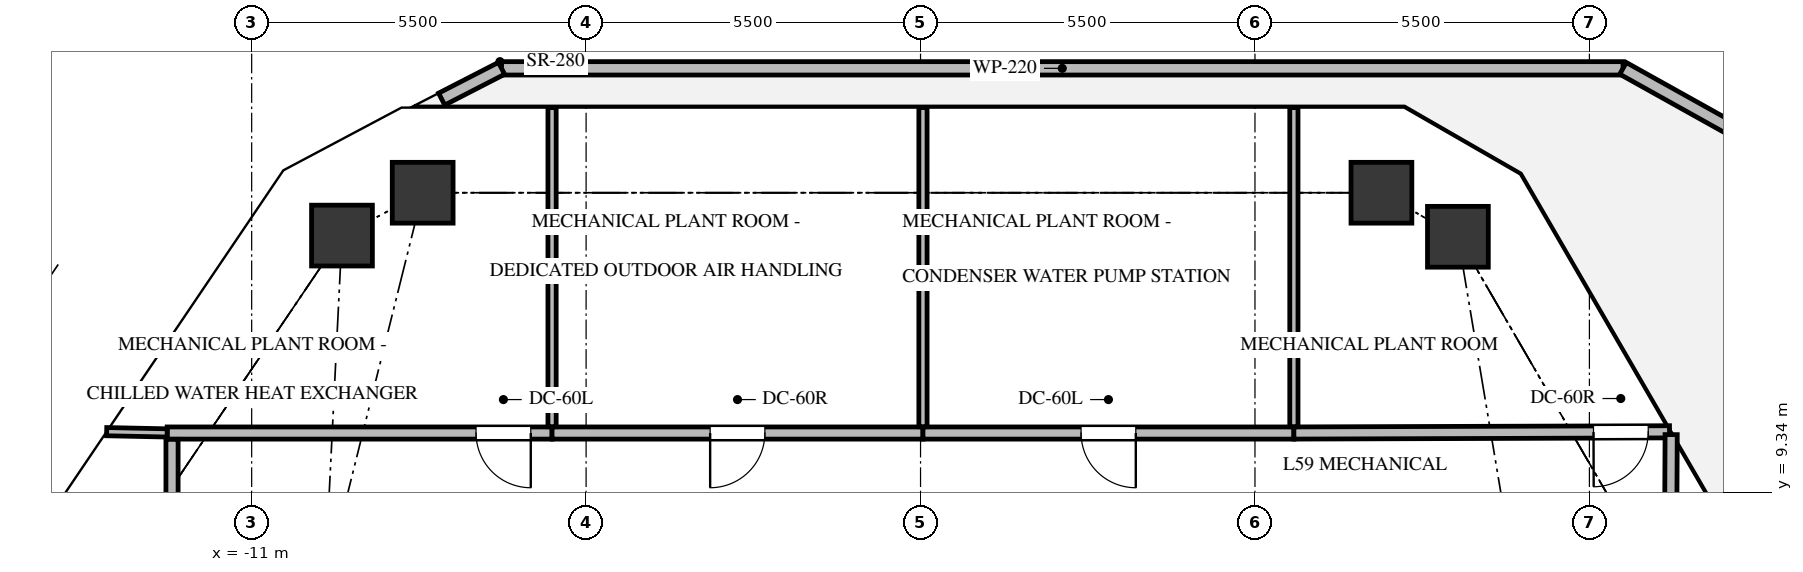
"""IFC4 building model, lengths in metres.
Left out: names, types, materials, properties, quantities, classifications, styles, units other than length and angle.
Written with IfcOpenShell. Run it as: python <this file> out.ifc"""

import sys

from ifc_helpers import new_model, si_unit, direction, frame, frame_2d, origin, origin_2d, place, context, subcontext, project, spatial, rectangle, extrude, source, transform, mapped, element, fill, save


model = new_model("IFC4")
c1 = context("Model", 3, precision=1e-05, world=origin(), true_north=direction((0.0, 1.0)))
c2 = subcontext(c1, "Body", "Model", "MODEL_VIEW")
j1 = project(units=[si_unit("LENGTHUNIT", "METRE"), si_unit("PLANEANGLEUNIT", "RADIAN")], contexts=[c1])
p1 = place(None, origin())
s1 = spatial("IfcSite", under=j1, at=p1, CompositionType="ELEMENT")
p2 = place(p1, origin())
s2 = spatial("IfcBuilding", under=s1, at=p2, CompositionType="ELEMENT")
p3 = place(p2, frame((0.0, 0.0, 213.4)))
s3 = spatial("IfcBuildingStorey", under=s2, at=p3, CompositionType="ELEMENT", Elevation=213.4)
m1 = source(origin(), c2, "Body", "SweptSolid", [
    extrude(rectangle(XDim=1.0, YDim=1.0, at=origin_2d()), origin(), (0.0, 0.0, 1.0), 4.96),
])
for number, where, z_axis, x_axis in (
    (1, (-9.515, 13.557, -0.3), (0.0, 0.0, 1.0), (1.0, 0.0, 0.0)),
    (2, (-8.188, 14.262, -0.3), (0.0, 0.0, 1.0), (1.0, 0.0, 0.0)),
    (3, (7.58, 14.262, -0.3), (0.0, 0.0, 1.0), (1.0, 0.0, 0.0)),
    (4, (8.837, 13.538, -0.3), (0.0, 0.0, 1.0), (1.0, 0.0, 0.0)),
):
    element("IfcColumn", number, at=place(p3, frame(where, z_axis=z_axis, x_axis=x_axis)), inside=s3, PredefinedType="COLUMN", context=c2, shape_type="MappedRepresentation", body=[
        mapped(m1, transform((0.0, 0.0, 0.0), x_axis=(1.0, 0.0, 0.0), y_axis=(0.0, 1.0, 0.0), z_axis=(0.0, 0.0, 1.0), scale=1.0)),
    ])
p4 = place(p3, frame((-6.891, 16.308, 0.0), z_axis=(0.0, 0.0, 1.0), x_axis=(1.0, 0.0, 0.0)))
e5 = element("IfcWall", 5, at=p4, inside=s3, PredefinedType="PARAPET", context=c2, shape_type="SweptSolid", body=[
    extrude(rectangle(XDim=18.443, YDim=0.22, at=frame_2d((9.222, 0.0))), origin(), (0.0, 0.0, 1.0), 1.2),
])
p5 = place(p3, frame((11.553, 16.308, 0.0), z_axis=(0.0, 0.0, 1.0), x_axis=(0.873406612347, -0.486991672936, 0.0)))
e6 = element("IfcWall", 6, at=p5, inside=s3, PredefinedType="PARAPET", context=c2, shape_type="SweptSolid", body=[
    extrude(rectangle(XDim=2.243, YDim=0.22, at=frame_2d((1.122, 0.0))), origin(), (0.0, 0.0, 1.0), 1.2),
])
p6 = place(p3, frame((-7.875, 15.802, 0.0), z_axis=(0.0, 0.0, 1.0), x_axis=(0.889387723215, 0.457153669781, 0.0)))
e7 = element("IfcWall", 7, at=p6, inside=s3, PredefinedType="PARAPET", context=c2, shape_type="SweptSolid", body=[
    extrude(rectangle(XDim=1.107, YDim=0.22, at=frame_2d((0.554, 0.0))), origin(), (0.0, 0.0, 1.0), 1.2),
])
p7 = place(p3, frame((-6.06, 10.31, 0.0), z_axis=(0.0, 0.0, 1.0), x_axis=(-1.0, 0.0, 0.0)))
e8 = element("IfcWall", 8, at=p7, inside=s3, PredefinedType="SOLIDWALL", context=c2, shape_type="SweptSolid", body=[
    extrude(rectangle(XDim=6.33, YDim=0.2, at=frame_2d((3.165, 0.0))), origin(), (0.0, 0.0, 1.0), 3.901),
])
p8 = place(p7, frame((0.35, 0.0, 0.0)))
e9 = element("IfcOpeningElement", 9, at=p8, cuts=e8, PredefinedType="OPENING", context=c2, shape_type="SweptSolid", body=[
    extrude(rectangle(XDim=0.9, YDim=2.05, at=frame_2d((0.45, 1.025))), frame((0.0, 0.11, 0.0), z_axis=(0.0, -1.0, 0.0), x_axis=(1.0, 0.0, 0.0)), (0.0, 0.0, 1.0), 0.22),
])
p9 = place(p3, frame((0.04, 10.31, 0.0), z_axis=(0.0, 0.0, 1.0), x_axis=(-1.0, 0.0, 0.0)))
e10 = element("IfcWall", 10, at=p9, inside=s3, PredefinedType="SOLIDWALL", context=c2, shape_type="SweptSolid", body=[
    extrude(rectangle(XDim=6.1, YDim=0.2, at=frame_2d((3.05, 0.0))), origin(), (0.0, 0.0, 1.0), 4.208),
])
p10 = place(p9, frame((2.6, 0.0, 0.0)))
e11 = element("IfcOpeningElement", 11, at=p10, cuts=e10, PredefinedType="OPENING", context=c2, shape_type="SweptSolid", body=[
    extrude(rectangle(XDim=0.9, YDim=2.05, at=frame_2d((0.45, 1.025))), frame((0.0, 0.11, 0.0), z_axis=(0.0, -1.0, 0.0), x_axis=(1.0, 0.0, 0.0)), (0.0, 0.0, 1.0), 0.22),
])
p11 = place(p3, frame((6.14, 10.31, 0.0), z_axis=(0.0, 0.0, 1.0), x_axis=(-1.0, 0.0, 0.0)))
e12 = element("IfcWall", 12, at=p11, inside=s3, PredefinedType="SOLIDWALL", context=c2, shape_type="SweptSolid", body=[
    extrude(rectangle(XDim=6.1, YDim=0.2, at=frame_2d((3.05, 0.0))), origin(), (0.0, 0.0, 1.0), 4.208),
])
p12 = place(p11, frame((2.6, 0.0, 0.0)))
e13 = element("IfcOpeningElement", 13, at=p12, cuts=e12, PredefinedType="OPENING", context=c2, shape_type="SweptSolid", body=[
    extrude(rectangle(XDim=0.9, YDim=2.05, at=frame_2d((0.45, 1.025))), frame((0.0, 0.11, 0.0), z_axis=(0.0, -1.0, 0.0), x_axis=(1.0, 0.0, 0.0)), (0.0, 0.0, 1.0), 0.22),
])
p13 = place(p3, frame((12.318, 10.33, 0.0), z_axis=(0.0, 0.0, 1.0), x_axis=(-0.999994876599, -0.003201058528, 0.0)))
e14 = element("IfcWall", 14, at=p13, inside=s3, PredefinedType="SOLIDWALL", context=c2, shape_type="SweptSolid", body=[
    extrude(rectangle(XDim=6.178, YDim=0.2, at=frame_2d((3.089, 0.0))), origin(), (0.0, 0.0, 1.0), 3.901),
])
p14 = place(p13, frame((0.35, 0.0, 0.0)))
e15 = element("IfcOpeningElement", 15, at=p14, cuts=e14, PredefinedType="OPENING", context=c2, shape_type="SweptSolid", body=[
    extrude(rectangle(XDim=0.9, YDim=2.05, at=frame_2d((0.45, 1.025))), frame((0.0, 0.11, 0.0), z_axis=(0.0, -1.0, 0.0), x_axis=(1.0, 0.0, 0.0)), (0.0, 0.0, 1.0), 0.22),
])
p15 = place(p3, frame((12.31, 3.49, 0.0), z_axis=(0.0, 0.0, 1.0), x_axis=(0.005031021246, 0.999987344333, 0.0)))
e16 = element("IfcWall", 16, at=p15, inside=s3, PredefinedType="SOLIDWALL", context=c2, shape_type="SweptSolid", body=[
    extrude(rectangle(XDim=6.794, YDim=0.2, at=frame_2d((3.397, 0.0))), origin(), (0.0, 0.0, 1.0), 3.999),
])
p16 = place(p15, frame((2.947, 0.0, 0.0)))
e17 = element("IfcOpeningElement", 17, at=p16, cuts=e16, PredefinedType="OPENING", context=c2, shape_type="SweptSolid", body=[
    extrude(rectangle(XDim=0.9, YDim=2.05, at=frame_2d((0.45, 1.025))), frame((0.0, 0.11, 0.0), z_axis=(0.0, -1.0, 0.0), x_axis=(1.0, 0.0, 0.0)), (0.0, 0.0, 1.0), 0.22),
])
p17 = place(p3, frame((-12.31, 10.206, 0.0), z_axis=(0.0, 0.0, 1.0), x_axis=(0.0, -1.0, 0.0)))
e18 = element("IfcWall", 18, at=p17, inside=s3, PredefinedType="SOLIDWALL", context=c2, shape_type="SweptSolid", body=[
    extrude(rectangle(XDim=6.716, YDim=0.2, at=frame_2d((3.358, 0.0))), origin(), (0.0, 0.0, 1.0), 3.999),
])
p18 = place(p17, frame((2.908, 0.0, 0.0)))
e19 = element("IfcOpeningElement", 19, at=p18, cuts=e18, PredefinedType="OPENING", context=c2, shape_type="SweptSolid", body=[
    extrude(rectangle(XDim=0.9, YDim=2.05, at=frame_2d((0.45, 1.025))), frame((0.0, 0.11, 0.0), z_axis=(0.0, -1.0, 0.0), x_axis=(1.0, 0.0, 0.0)), (0.0, 0.0, 1.0), 0.22),
])
p19 = place(p3, frame((-6.06, 15.662, 0.0), z_axis=(0.0, 0.0, 1.0), x_axis=(0.0, -1.0, 0.0)))
e20 = element("IfcWall", 20, at=p19, inside=s3, PredefinedType="PARTITIONING", context=c2, shape_type="SweptSolid", body=[
    extrude(rectangle(XDim=5.248, YDim=0.135, at=frame_2d((2.624, 0.0))), origin(), (0.0, 0.0, 1.0), 3.999),
])
p20 = place(p3, frame((-12.39, 10.312, 0.0), z_axis=(0.0, 0.0, 1.0), x_axis=(-0.999782630862, 0.020849245246, 0.0)))
e21 = element("IfcWall", 21, at=p20, inside=s3, PredefinedType="PARTITIONING", context=c2, shape_type="SweptSolid", body=[
    extrude(rectangle(XDim=0.995, YDim=0.135, at=frame_2d((0.498, 0.0))), origin(), (0.0, 0.0, 1.0), 4.645),
])
p21 = place(p3, frame((0.04, 15.662, 0.0), z_axis=(0.0, 0.0, 1.0), x_axis=(0.0, -1.0, 0.0)))
e22 = element("IfcWall", 22, at=p21, inside=s3, PredefinedType="PARTITIONING", context=c2, shape_type="SweptSolid", body=[
    extrude(rectangle(XDim=5.248, YDim=0.135, at=frame_2d((2.624, 0.0))), origin(), (0.0, 0.0, 1.0), 3.999),
])
p22 = place(p3, frame((6.14, 15.662, 0.0), z_axis=(0.0, 0.0, 1.0), x_axis=(0.0, -1.0, 0.0)))
e23 = element("IfcWall", 23, at=p22, inside=s3, PredefinedType="PARTITIONING", context=c2, shape_type="SweptSolid", body=[
    extrude(rectangle(XDim=5.248, YDim=0.135, at=frame_2d((2.624, 0.0))), origin(), (0.0, 0.0, 1.0), 3.999),
])
m2 = source(origin(), c2, "Body", "SweptSolid", [
    extrude(rectangle(XDim=0.9, YDim=2.05, at=frame_2d((0.45, 1.025))), frame((0.0, 0.025, 0.0), z_axis=(0.0, -1.0, 0.0), x_axis=(1.0, 0.0, 0.0)), (0.0, 0.0, 1.0), 0.05),
])
p23 = place(p8, origin())
e24 = element("IfcDoor", 24, at=p23, inside=s3, OperationType="SINGLE_SWING_LEFT", PredefinedType="DOOR", context=c2, shape_type="MappedRepresentation", body=[
    mapped(m2, transform((0.0, 0.0, 0.0), x_axis=(1.0, 0.0, 0.0), y_axis=(0.0, 1.0, 0.0), z_axis=(0.0, 0.0, 1.0), scale=1.0)),
])
fill(e9, e24)
m3 = source(origin(), c2, "Body", "SweptSolid", [
    extrude(rectangle(XDim=0.9, YDim=2.05, at=frame_2d((0.45, 1.025))), frame((0.0, 0.025, 0.0), z_axis=(0.0, -1.0, 0.0), x_axis=(1.0, 0.0, 0.0)), (0.0, 0.0, 1.0), 0.05),
])
p24 = place(p10, origin())
e25 = element("IfcDoor", 25, at=p24, inside=s3, OperationType="SINGLE_SWING_RIGHT", PredefinedType="DOOR", context=c2, shape_type="MappedRepresentation", body=[
    mapped(m3, transform((0.0, 0.0, 0.0), x_axis=(1.0, 0.0, 0.0), y_axis=(0.0, 1.0, 0.0), z_axis=(0.0, 0.0, 1.0), scale=1.0)),
])
fill(e11, e25)
p25 = place(p12, origin())
e26 = element("IfcDoor", 26, at=p25, inside=s3, OperationType="SINGLE_SWING_LEFT", PredefinedType="DOOR", context=c2, shape_type="MappedRepresentation", body=[
    mapped(m2, transform((0.0, 0.0, 0.0), x_axis=(1.0, 0.0, 0.0), y_axis=(0.0, 1.0, 0.0), z_axis=(0.0, 0.0, 1.0), scale=1.0)),
])
fill(e13, e26)
p26 = place(p14, origin())
e27 = element("IfcDoor", 27, at=p26, inside=s3, OperationType="SINGLE_SWING_RIGHT", PredefinedType="DOOR", context=c2, shape_type="MappedRepresentation", body=[
    mapped(m3, transform((0.0, 0.0, 0.0), x_axis=(1.0, 0.0, 0.0), y_axis=(0.0, 1.0, 0.0), z_axis=(0.0, 0.0, 1.0), scale=1.0)),
])
fill(e15, e27)
save(model, sys.argv[1])
